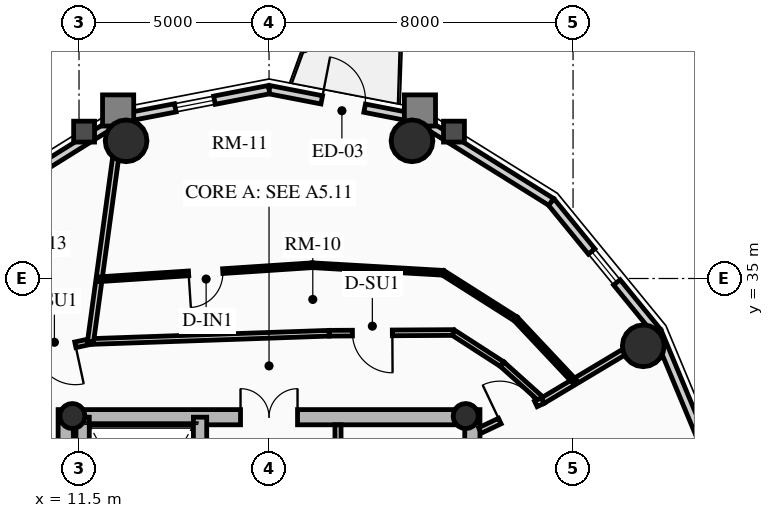
"""IFC4 building model, lengths in metres.
Left out: names, types, materials, properties, quantities, classifications, styles, units other than length and angle.
Written with IfcOpenShell. Run it as: python <this file> out.ifc"""

import sys

from ifc_helpers import new_model, si_unit, direction, frame, frame_2d, origin, origin_2d, place, context, subcontext, project, spatial, rectangle, circle, hollow_circle, extrude, source, transform, mapped, element, fill, save


model = new_model("IFC4")
c1 = context("Model", 3, precision=1e-05, world=origin(), true_north=direction((0.0, 1.0)))
c2 = subcontext(c1, "Body", "Model", "MODEL_VIEW")
j1 = project(units=[si_unit("LENGTHUNIT", "METRE"), si_unit("PLANEANGLEUNIT", "RADIAN")], contexts=[c1])
p1 = place(None, origin())
s1 = spatial("IfcSite", under=j1, at=p1, CompositionType="ELEMENT")
p2 = place(p1, origin())
s2 = spatial("IfcBuilding", under=s1, at=p2, CompositionType="ELEMENT")
p3 = place(p2, frame((0.0, 0.0, 214.12)))
s3 = spatial("IfcBuildingStorey", under=s2, at=p3, CompositionType="ELEMENT", Elevation=214.12)
for number, where, z_axis, x_axis in (
    (1, (11.15, 17.45, 0.0), (0.0, 0.0, 1.0), (0.0, 1.0, 0.0)),
    (2, (21.85, 17.45, 0.0), (0.0, 0.0, 1.0), (0.0, 1.0, 0.0)),
):
    element("IfcWall", number, at=place(p3, frame(where, z_axis=z_axis, x_axis=x_axis)), inside=s3, PredefinedType="SHEAR", context=c2, shape_type="SweptSolid", body=[
        extrude(rectangle(XDim=14.1, YDim=0.4, at=frame_2d((7.05, 0.0))), origin(), (0.0, 0.0, 1.0), 2.91),
    ])
p4 = place(p3, frame((11.15, 31.35, 0.0), z_axis=(0.0, 0.0, 1.0), x_axis=(1.0, 0.0, 0.0)))
e3 = element("IfcWall", 3, at=p4, inside=s3, PredefinedType="SHEAR", context=c2, shape_type="SweptSolid", body=[
    extrude(rectangle(XDim=10.7, YDim=0.4, at=frame_2d((5.35, 0.0))), origin(), (0.0, 0.0, 1.0), 2.91),
])
m1 = source(origin(), c2, "Body", "SweptSolid", [
    extrude(rectangle(XDim=1.5, YDim=2.02, at=frame_2d((0.75, 1.01))), frame((0.0, 0.21, 0.0), z_axis=(0.0, -1.0, 0.0), x_axis=(1.0, 0.0, 0.0)), (0.0, 0.0, 1.0), 0.42),
])
p5 = place(p4, frame((4.6, 0.0, 0.0)))
e4 = element("IfcOpeningElement", 4, at=p5, cuts=e3, PredefinedType="OPENING", context=c2, shape_type="MappedRepresentation", body=[
    mapped(m1, transform((0.0, 0.0, 0.0), x_axis=(1.0, 0.0, 0.0), y_axis=(0.0, 1.0, 0.0), z_axis=(0.0, 0.0, 1.0), scale=1.0)),
])
p6 = place(p3, frame((14.685, 17.65, 0.0), z_axis=(0.0, 0.0, 1.0), x_axis=(0.0, 1.0, 0.0)))
e5 = element("IfcWall", 5, at=p6, inside=s3, PredefinedType="SHEAR", context=c2, shape_type="SweptSolid", body=[
    extrude(rectangle(XDim=13.7, YDim=0.35, at=frame_2d((6.85, 0.0))), origin(), (0.0, 0.0, 1.0), 2.91),
])
m2 = source(origin(), c2, "Body", "SweptSolid", [
    extrude(rectangle(XDim=1.1, YDim=2.015, at=frame_2d((0.55, 1.007))), frame((0.0, 0.185, 0.0), z_axis=(0.0, -1.0, 0.0), x_axis=(1.0, 0.0, 0.0)), (0.0, 0.0, 1.0), 0.37),
])
p7 = place(p6, frame((4.85, 0.0, 0.0)))
e6 = element("IfcOpeningElement", 6, at=p7, cuts=e5, PredefinedType="OPENING", context=c2, shape_type="MappedRepresentation", body=[
    mapped(m2, transform((0.0, 0.0, 0.0), x_axis=(1.0, 0.0, 0.0), y_axis=(0.0, 1.0, 0.0), z_axis=(0.0, 0.0, 1.0), scale=1.0)),
])
p8 = place(p6, frame((0.625, 0.0, 0.0)))
e7 = element("IfcOpeningElement", 7, at=p8, cuts=e5, PredefinedType="OPENING", context=c2, shape_type="MappedRepresentation", body=[
    mapped(m2, transform((0.0, 0.0, 0.0), x_axis=(1.0, 0.0, 0.0), y_axis=(0.0, 1.0, 0.0), z_axis=(0.0, 0.0, 1.0), scale=1.0)),
])
p9 = place(p6, frame((2.625, 0.0, 0.0)))
e8 = element("IfcOpeningElement", 8, at=p9, cuts=e5, PredefinedType="OPENING", context=c2, shape_type="MappedRepresentation", body=[
    mapped(m2, transform((0.0, 0.0, 0.0), x_axis=(1.0, 0.0, 0.0), y_axis=(0.0, 1.0, 0.0), z_axis=(0.0, 0.0, 1.0), scale=1.0)),
])
m3 = source(origin(), c2, "Body", "SweptSolid", [
    extrude(rectangle(XDim=1.15, YDim=2.02, at=frame_2d((0.575, 1.01))), frame((0.0, 0.185, 0.0), z_axis=(0.0, -1.0, 0.0), x_axis=(1.0, 0.0, 0.0)), (0.0, 0.0, 1.0), 0.37),
])
p10 = place(p6, frame((7.27, 0.0, 0.0)))
e9 = element("IfcOpeningElement", 9, at=p10, cuts=e5, PredefinedType="OPENING", context=c2, shape_type="MappedRepresentation", body=[
    mapped(m3, transform((0.0, 0.0, 0.0), x_axis=(1.0, 0.0, 0.0), y_axis=(0.0, 1.0, 0.0), z_axis=(0.0, 0.0, 1.0), scale=1.0)),
])
p11 = place(p3, frame((11.595, 24.655, 0.0), z_axis=(0.0, 0.0, 1.0), x_axis=(0.0, 1.0, 0.0)))
e10 = element("IfcWall", 10, at=p11, inside=s3, PredefinedType="SHEAR", context=c2, shape_type="SweptSolid", body=[
    extrude(rectangle(XDim=6.695, YDim=0.35, at=frame_2d((3.348, 0.0))), origin(), (0.0, 0.0, 1.0), 2.91),
])
for number, where, z_axis, x_axis in (
    (11, (11.325, 31.38, 0.0), (0.0, 0.0, 1.0), (1.0, 0.0, 0.0)),
    (12, (21.675, 31.38, 0.0), (0.0, 0.0, 1.0), (1.0, 0.0, 0.0)),
):
    element("IfcColumn", number, at=place(p3, frame(where, z_axis=z_axis, x_axis=x_axis)), inside=s3, PredefinedType="COLUMN", context=c2, shape_type="SweptSolid", body=[
        extrude(hollow_circle(Radius=0.33, WallThickness=0.025, at=origin_2d()), origin(), (0.0, 0.0, 1.0), 2.91),
    ])
for number, where, z_axis, x_axis in (
    (13, (26.347, 33.229, 0.0), (0.0, 0.0, 1.0), (1.0, 0.0, 0.0)),
    (14, (20.261, 38.623, 0.0), (0.0, 0.0, 1.0), (1.0, 0.0, 0.0)),
    (15, (12.739, 38.623, 0.0), (0.0, 0.0, 1.0), (1.0, 0.0, 0.0)),
):
    element("IfcColumn", number, at=place(p3, frame(where, z_axis=z_axis, x_axis=x_axis)), inside=s3, PredefinedType="USERDEFINED", context=c2, shape_type="SweptSolid", body=[
        extrude(circle(Radius=0.55, at=origin_2d()), origin(), (0.0, 0.0, 1.0), 2.91),
    ])
p12 = place(p3, frame((26.718, 33.593, 0.0), z_axis=(0.0, 0.0, 1.0), x_axis=(0.384036305194, -0.923317993052, 0.0)))
e16 = element("IfcWall", 16, at=p12, inside=s3, PredefinedType="SOLIDWALL", context=c2, shape_type="SweptSolid", body=[
    extrude(rectangle(XDim=4.671, YDim=0.22, at=frame_2d((2.335, 0.0))), origin(), (0.0, 0.0, 1.0), 2.322),
])
p13 = place(p3, frame((23.924, 37.015, 0.0), z_axis=(0.0, 0.0, 1.0), x_axis=(0.632467166636, -0.774587169483, 0.0)))
e17 = element("IfcWall", 17, at=p13, inside=s3, PredefinedType="SOLIDWALL", context=c2, shape_type="SweptSolid", body=[
    extrude(rectangle(XDim=4.418, YDim=0.22, at=frame_2d((2.209, 0.0))), origin(), (0.0, 0.0, 1.0), 2.322),
])
m4 = source(origin(), c2, "Body", "SweptSolid", [
    extrude(rectangle(XDim=1.05, YDim=1.3, at=frame_2d((0.525, 0.65))), frame((0.0, 0.12, 0.0), z_axis=(0.0, -1.0, 0.0), x_axis=(1.0, 0.0, 0.0)), (0.0, 0.0, 1.0), 0.24),
])
p14 = place(p13, frame((1.684, 0.0, 0.65)))
e18 = element("IfcOpeningElement", 18, at=p14, cuts=e17, PredefinedType="OPENING", context=c2, shape_type="MappedRepresentation", body=[
    mapped(m4, transform((0.0, 0.0, 0.0), x_axis=(1.0, 0.0, 0.0), y_axis=(0.0, 1.0, 0.0), z_axis=(0.0, 0.0, 1.0), scale=1.0)),
])
p15 = place(p3, frame((20.403, 39.213, 0.0), z_axis=(0.0, 0.0, 1.0), x_axis=(0.848318713376, -0.529485939886, 0.0)))
e19 = element("IfcWall", 19, at=p15, inside=s3, PredefinedType="SOLIDWALL", context=c2, shape_type="SweptSolid", body=[
    extrude(rectangle(XDim=4.15, YDim=0.22, at=frame_2d((2.075, 0.0))), origin(), (0.0, 0.0, 1.0), 2.322),
])
p16 = place(p3, frame((16.5, 39.97, 0.0), z_axis=(0.0, 0.0, 1.0), x_axis=(0.981700307484, -0.190432419211, 0.0)))
e20 = element("IfcWall", 20, at=p16, inside=s3, PredefinedType="SOLIDWALL", context=c2, shape_type="SweptSolid", body=[
    extrude(rectangle(XDim=3.976, YDim=0.22, at=frame_2d((1.988, 0.0))), origin(), (0.0, 0.0, 1.0), 2.322),
])
m5 = source(origin(), c2, "Body", "SweptSolid", [
    extrude(rectangle(XDim=1.15, YDim=2.005, at=frame_2d((0.575, 1.002))), frame((0.0, 0.12, 0.0), z_axis=(0.0, -1.0, 0.0), x_axis=(1.0, 0.0, 0.0)), (0.0, 0.0, 1.0), 0.24),
])
p17 = place(p16, frame((1.413, 0.0, 0.0)))
e21 = element("IfcOpeningElement", 21, at=p17, cuts=e20, PredefinedType="OPENING", context=c2, shape_type="MappedRepresentation", body=[
    mapped(m5, transform((0.0, 0.0, 0.0), x_axis=(1.0, 0.0, 0.0), y_axis=(0.0, 1.0, 0.0), z_axis=(0.0, 0.0, 1.0), scale=1.0)),
])
p18 = place(p3, frame((12.597, 39.213, 0.0), z_axis=(0.0, 0.0, 1.0), x_axis=(0.981700307484, 0.190432419211, 0.0)))
e22 = element("IfcWall", 22, at=p18, inside=s3, PredefinedType="SOLIDWALL", context=c2, shape_type="SweptSolid", body=[
    extrude(rectangle(XDim=3.976, YDim=0.22, at=frame_2d((1.988, 0.0))), origin(), (0.0, 0.0, 1.0), 2.322),
])
p19 = place(p18, frame((1.463, 0.0, 0.65)))
e23 = element("IfcOpeningElement", 23, at=p19, cuts=e22, PredefinedType="OPENING", context=c2, shape_type="MappedRepresentation", body=[
    mapped(m4, transform((0.0, 0.0, 0.0), x_axis=(1.0, 0.0, 0.0), y_axis=(0.0, 1.0, 0.0), z_axis=(0.0, 0.0, 1.0), scale=1.0)),
])
p20 = place(p3, frame((9.076, 37.015, 0.0), z_axis=(0.0, 0.0, 1.0), x_axis=(0.848318713376, 0.529485939886, 0.0)))
e24 = element("IfcWall", 24, at=p20, inside=s3, PredefinedType="SOLIDWALL", context=c2, shape_type="SweptSolid", body=[
    extrude(rectangle(XDim=4.15, YDim=0.22, at=frame_2d((2.075, 0.0))), origin(), (0.0, 0.0, 1.0), 2.322),
])
p21 = place(p3, frame((18.315, 27.25, 0.0), z_axis=(0.0, 0.0, 1.0), x_axis=(0.0, 1.0, 0.0)))
e25 = element("IfcWall", 25, at=p21, inside=s3, PredefinedType="PARTITIONING", context=c2, shape_type="SweptSolid", body=[
    extrude(rectangle(XDim=3.9, YDim=0.16, at=frame_2d((1.95, 0.0))), origin(), (0.0, 0.0, 1.0), 2.685),
])
m6 = source(origin(), c2, "Body", "SweptSolid", [
    extrude(rectangle(XDim=0.9, YDim=2.005, at=frame_2d((0.45, 1.002))), frame((0.0, 0.09, 0.0), z_axis=(0.0, -1.0, 0.0), x_axis=(1.0, 0.0, 0.0)), (0.0, 0.0, 1.0), 0.18),
])
p22 = place(p21, frame((2.2, 0.0, 0.0)))
e26 = element("IfcOpeningElement", 26, at=p22, cuts=e25, PredefinedType="OPENING", context=c2, shape_type="MappedRepresentation", body=[
    mapped(m6, transform((0.0, 0.0, 0.0), x_axis=(1.0, 0.0, 0.0), y_axis=(0.0, 1.0, 0.0), z_axis=(0.0, 0.0, 1.0), scale=1.0)),
])
p23 = place(p3, frame((23.701, 31.786, 0.0), z_axis=(0.0, 0.0, 1.0), x_axis=(-0.743742806382, 0.668465883913, 0.0)))
e27 = element("IfcWall", 27, at=p23, inside=s3, PredefinedType="PARTITIONING", context=c2, shape_type="SweptSolid", body=[
    extrude(rectangle(XDim=1.434, YDim=0.15, at=frame_2d((0.717, 0.0))), origin(), (0.0, 0.0, 1.0), 2.322),
])
p24 = place(p3, frame((22.635, 32.744, 0.0), z_axis=(0.0, 0.0, 1.0), x_axis=(-0.840119270642, 0.542401706391, 0.0)))
e28 = element("IfcWall", 28, at=p24, inside=s3, PredefinedType="PARTITIONING", context=c2, shape_type="SweptSolid", body=[
    extrude(rectangle(XDim=1.538, YDim=0.15, at=frame_2d((0.769, 0.0))), origin(), (0.0, 0.0, 1.0), 2.255),
])
p25 = place(p3, frame((21.344, 33.578, 0.0), z_axis=(0.0, 0.0, 1.0), x_axis=(-0.999984243152, -0.005613684, 0.0)))
e29 = element("IfcWall", 29, at=p25, inside=s3, PredefinedType="PARTITIONING", context=c2, shape_type="SweptSolid", body=[
    extrude(rectangle(XDim=3.262, YDim=0.15, at=frame_2d((1.631, 0.0))), origin(), (0.0, 0.0, 1.0), 2.322),
])
m7 = source(origin(), c2, "Body", "SweptSolid", [
    extrude(rectangle(XDim=1.05, YDim=2.015, at=frame_2d((0.525, 1.007))), frame((0.0, 0.085, 0.0), z_axis=(0.0, -1.0, 0.0), x_axis=(1.0, 0.0, 0.0)), (0.0, 0.0, 1.0), 0.17),
])
p26 = place(p25, frame((1.599, 0.0, 0.0)))
e30 = element("IfcOpeningElement", 30, at=p26, cuts=e29, PredefinedType="OPENING", context=c2, shape_type="MappedRepresentation", body=[
    mapped(m7, transform((0.0, 0.0, 0.0), x_axis=(1.0, 0.0, 0.0), y_axis=(0.0, 1.0, 0.0), z_axis=(0.0, 0.0, 1.0), scale=1.0)),
])
p27 = place(p3, frame((18.082, 33.56, 0.0), z_axis=(0.0, 0.0, 1.0), x_axis=(-0.999399009709, -0.034664382185, 0.0)))
e31 = element("IfcWall", 31, at=p27, inside=s3, PredefinedType="PARTITIONING", context=c2, shape_type="SweptSolid", body=[
    extrude(rectangle(XDim=6.282, YDim=0.15, at=frame_2d((3.141, 0.0))), origin(), (0.0, 0.0, 1.0), 2.255),
])
p28 = place(p3, frame((11.803, 33.342, 0.0), z_axis=(0.0, 0.0, 1.0), x_axis=(-0.977750742783, -0.209770076483, 0.0)))
e32 = element("IfcWall", 32, at=p28, inside=s3, PredefinedType="PARTITIONING", context=c2, shape_type="SweptSolid", body=[
    extrude(rectangle(XDim=1.868, YDim=0.15, at=frame_2d((0.934, 0.0))), origin(), (0.0, 0.0, 1.0), 2.255),
])
p29 = place(p28, frame((0.409, 0.0, 0.0)))
e33 = element("IfcOpeningElement", 33, at=p29, cuts=e32, PredefinedType="OPENING", context=c2, shape_type="MappedRepresentation", body=[
    mapped(m7, transform((0.0, 0.0, 0.0), x_axis=(1.0, 0.0, 0.0), y_axis=(0.0, 1.0, 0.0), z_axis=(0.0, 0.0, 1.0), scale=1.0)),
])
p30 = place(p3, frame((23.701, 31.786, 0.0), z_axis=(0.0, 0.0, 1.0), x_axis=(0.858059206709, 0.513550774298, 0.0)))
e34 = element("IfcWall", 34, at=p30, inside=s3, PredefinedType="PARTITIONING", context=c2, shape_type="SweptSolid", body=[
    extrude(rectangle(XDim=3.497, YDim=0.16, at=frame_2d((1.748, 0.0))), origin(), (0.0, 0.0, 1.0), 2.322),
])
p31 = place(p3, frame((11.803, 33.342, 0.0), z_axis=(0.0, 0.0, 1.0), x_axis=(0.135452591041, 0.990783828885, 0.0)))
e35 = element("IfcWall", 35, at=p31, inside=s3, PredefinedType="PARTITIONING", context=c2, shape_type="SweptSolid", body=[
    extrude(rectangle(XDim=5.906, YDim=0.16, at=frame_2d((2.953, 0.0))), origin(), (0.0, 0.0, 1.0), 2.322),
])
p32 = place(p3, frame((22.05, 31.0, 0.0), z_axis=(0.0, 0.0, 1.0), x_axis=(0.903013459407, 0.429612257891, 0.0)))
e36 = element("IfcWall", 36, at=p32, inside=s3, PredefinedType="PARTITIONING", context=c2, shape_type="SweptSolid", body=[
    extrude(rectangle(XDim=1.829, YDim=0.16, at=frame_2d((0.914, 0.0))), origin(), (0.0, 0.0, 1.0), 2.255),
])
m8 = source(origin(), c2, "Body", "SweptSolid", [
    extrude(rectangle(XDim=1.05, YDim=2.015, at=frame_2d((0.525, 1.007))), frame((0.0, 0.09, 0.0), z_axis=(0.0, -1.0, 0.0), x_axis=(1.0, 0.0, 0.0)), (0.0, 0.0, 1.0), 0.18),
])
p33 = place(p32, frame((0.579, 0.0, 0.0)))
e37 = element("IfcOpeningElement", 37, at=p33, cuts=e36, PredefinedType="OPENING", context=c2, shape_type="MappedRepresentation", body=[
    mapped(m8, transform((0.0, 0.0, 0.0), x_axis=(1.0, 0.0, 0.0), y_axis=(0.0, 1.0, 0.0), z_axis=(0.0, 0.0, 1.0), scale=1.0)),
])
p34 = place(p3, frame((24.542, 32.288, 0.0), z_axis=(0.0, 0.0, 1.0), x_axis=(-0.68501091047, 0.72853280814, 0.0)))
e38 = element("IfcWall", 38, at=p34, inside=s3, PredefinedType="PARTITIONING", context=c2, shape_type="SweptSolid", body=[
    extrude(rectangle(XDim=2.261, YDim=0.125, at=frame_2d((1.13, 0.0))), origin(), (0.0, 0.0, 1.0), 2.322),
])
p35 = place(p3, frame((22.993, 33.935, 0.0), z_axis=(0.0, 0.0, 1.0), x_axis=(-0.844312558894, 0.535851008112, 0.0)))
e39 = element("IfcWall", 39, at=p35, inside=s3, PredefinedType="PARTITIONING", context=c2, shape_type="SweptSolid", body=[
    extrude(rectangle(XDim=2.268, YDim=0.125, at=frame_2d((1.134, 0.0))), origin(), (0.0, 0.0, 1.0), 2.255),
])
p36 = place(p3, frame((21.078, 35.15, 0.0), z_axis=(0.0, 0.0, 1.0), x_axis=(-0.99833900121, 0.057612834184, 0.0)))
e40 = element("IfcWall", 40, at=p36, inside=s3, PredefinedType="PARTITIONING", context=c2, shape_type="SweptSolid", body=[
    extrude(rectangle(XDim=3.445, YDim=0.125, at=frame_2d((1.723, 0.0))), origin(), (0.0, 0.0, 1.0), 2.322),
])
p37 = place(p3, frame((17.639, 35.349, 0.0), z_axis=(0.0, 0.0, 1.0), x_axis=(-0.997849042159, -0.065553711275, 0.0)))
e41 = element("IfcWall", 41, at=p37, inside=s3, PredefinedType="PARTITIONING", context=c2, shape_type="SweptSolid", body=[
    extrude(rectangle(XDim=5.624, YDim=0.125, at=frame_2d((2.812, 0.0))), origin(), (0.0, 0.0, 1.0), 2.255),
])
m9 = source(origin(), c2, "Body", "SweptSolid", [
    extrude(rectangle(XDim=0.9, YDim=2.005, at=frame_2d((0.45, 1.002))), frame((0.0, 0.073, 0.0), z_axis=(0.0, -1.0, 0.0), x_axis=(1.0, 0.0, 0.0)), (0.0, 0.0, 1.0), 0.145),
])
p38 = place(p37, frame((2.362, 0.0, 0.0)))
e42 = element("IfcOpeningElement", 42, at=p38, cuts=e41, PredefinedType="OPENING", context=c2, shape_type="MappedRepresentation", body=[
    mapped(m9, transform((0.0, 0.0, 0.0), x_axis=(1.0, 0.0, 0.0), y_axis=(0.0, 1.0, 0.0), z_axis=(0.0, 0.0, 1.0), scale=1.0)),
])
m10 = source(origin(), c2, "Body", "SweptSolid", [
    extrude(rectangle(XDim=1.05, YDim=1.3, at=frame_2d((0.525, 0.65))), frame((0.0, 0.03, 0.0), z_axis=(0.0, -1.0, 0.0), x_axis=(1.0, 0.0, 0.0)), (0.0, 0.0, 1.0), 0.06),
])
p39 = place(p14, origin())
e43 = element("IfcWindow", 43, at=p39, inside=s3, PartitioningType="SINGLE_PANEL", PredefinedType="WINDOW", context=c2, shape_type="MappedRepresentation", body=[
    mapped(m10, transform((0.0, 0.0, 0.0), x_axis=(1.0, 0.0, 0.0), y_axis=(0.0, 1.0, 0.0), z_axis=(0.0, 0.0, 1.0), scale=1.0)),
])
fill(e18, e43)
m11 = source(origin(), c2, "Body", "SweptSolid", [
    extrude(rectangle(XDim=1.15, YDim=2.005, at=frame_2d((0.575, 1.002))), frame((0.0, 0.025, 0.0), z_axis=(0.0, -1.0, 0.0), x_axis=(1.0, 0.0, 0.0)), (0.0, 0.0, 1.0), 0.05),
])
p40 = place(p17, origin())
e44 = element("IfcDoor", 44, at=p40, inside=s3, OperationType="SINGLE_SWING_LEFT", PredefinedType="DOOR", context=c2, shape_type="MappedRepresentation", body=[
    mapped(m11, transform((0.0, 0.0, 0.0), x_axis=(1.0, 0.0, 0.0), y_axis=(0.0, 1.0, 0.0), z_axis=(0.0, 0.0, 1.0), scale=1.0)),
])
fill(e21, e44)
p41 = place(p19, origin())
e45 = element("IfcWindow", 45, at=p41, inside=s3, PartitioningType="SINGLE_PANEL", PredefinedType="WINDOW", context=c2, shape_type="MappedRepresentation", body=[
    mapped(m10, transform((0.0, 0.0, 0.0), x_axis=(1.0, 0.0, 0.0), y_axis=(0.0, 1.0, 0.0), z_axis=(0.0, 0.0, 1.0), scale=1.0)),
])
fill(e23, e45)
m12 = source(origin(), c2, "Body", "SweptSolid", [
    extrude(rectangle(XDim=1.5, YDim=2.02, at=frame_2d((0.75, 1.01))), frame((0.0, 0.025, 0.0), z_axis=(0.0, -1.0, 0.0), x_axis=(1.0, 0.0, 0.0)), (0.0, 0.0, 1.0), 0.05),
])
p42 = place(p5, origin())
e46 = element("IfcDoor", 46, at=p42, inside=s3, OperationType="DOUBLE_DOOR_SINGLE_SWING", PredefinedType="DOOR", context=c2, shape_type="MappedRepresentation", body=[
    mapped(m12, transform((0.0, 0.0, 0.0), x_axis=(1.0, 0.0, 0.0), y_axis=(0.0, 1.0, 0.0), z_axis=(0.0, 0.0, 1.0), scale=1.0)),
])
fill(e4, e46)
m13 = source(origin(), c2, "Body", "SweptSolid", [
    extrude(rectangle(XDim=1.05, YDim=2.015, at=frame_2d((0.525, 1.007))), frame((0.0, 0.025, 0.0), z_axis=(0.0, -1.0, 0.0), x_axis=(1.0, 0.0, 0.0)), (0.0, 0.0, 1.0), 0.05),
])
p43 = place(p33, origin())
e47 = element("IfcDoor", 47, at=p43, inside=s3, OperationType="SINGLE_SWING_LEFT", PredefinedType="DOOR", context=c2, shape_type="MappedRepresentation", body=[
    mapped(m13, transform((0.0, 0.0, 0.0), x_axis=(1.0, 0.0, 0.0), y_axis=(0.0, 1.0, 0.0), z_axis=(0.0, 0.0, 1.0), scale=1.0)),
])
fill(e37, e47)
p44 = place(p26, origin())
e48 = element("IfcDoor", 48, at=p44, inside=s3, OperationType="SINGLE_SWING_LEFT", PredefinedType="DOOR", context=c2, shape_type="MappedRepresentation", body=[
    mapped(m13, transform((0.0, 0.0, 0.0), x_axis=(1.0, 0.0, 0.0), y_axis=(0.0, 1.0, 0.0), z_axis=(0.0, 0.0, 1.0), scale=1.0)),
])
fill(e30, e48)
m14 = source(origin(), c2, "Body", "SweptSolid", [
    extrude(rectangle(XDim=0.9, YDim=2.005, at=frame_2d((0.45, 1.002))), frame((0.0, 0.025, 0.0), z_axis=(0.0, -1.0, 0.0), x_axis=(1.0, 0.0, 0.0)), (0.0, 0.0, 1.0), 0.05),
])
p45 = place(p38, origin())
e49 = element("IfcDoor", 49, at=p45, inside=s3, OperationType="SINGLE_SWING_RIGHT", PredefinedType="DOOR", context=c2, shape_type="MappedRepresentation", body=[
    mapped(m14, transform((0.0, 0.0, 0.0), x_axis=(1.0, 0.0, 0.0), y_axis=(0.0, 1.0, 0.0), z_axis=(0.0, 0.0, 1.0), scale=1.0)),
])
fill(e42, e49)
p46 = place(p29, origin())
e50 = element("IfcDoor", 50, at=p46, inside=s3, OperationType="SINGLE_SWING_LEFT", PredefinedType="DOOR", context=c2, shape_type="MappedRepresentation", body=[
    mapped(m13, transform((0.0, 0.0, 0.0), x_axis=(1.0, 0.0, 0.0), y_axis=(0.0, 1.0, 0.0), z_axis=(0.0, 0.0, 1.0), scale=1.0)),
])
fill(e33, e50)
save(model, sys.argv[1])
